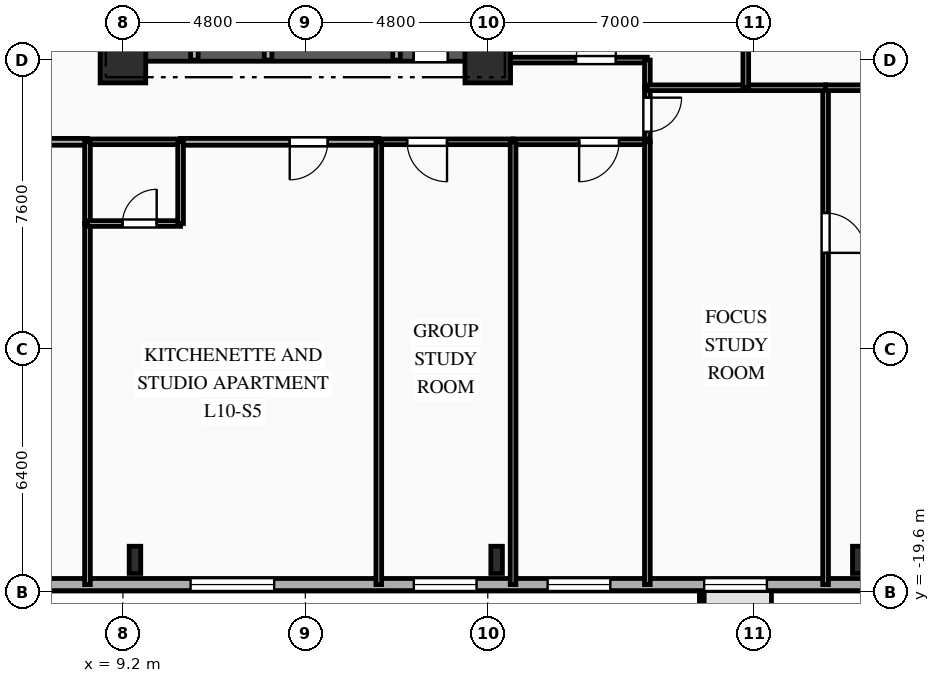
"""IFC4 building model, lengths in metres.
Left out: names, types, materials, properties, quantities, classifications, styles, units other than length and angle.
Written with IfcOpenShell. Run it as: python <this file> out.ifc"""

import sys

from ifc_helpers import new_model, si_unit, direction, frame, frame_2d, origin, origin_2d, place, context, subcontext, project, spatial, rectangle, i_section, extrude, element, fill, save


model = new_model("IFC4")
c1 = context("Model", 3, precision=1e-05, world=origin(), true_north=direction((0.0, 1.0)))
c2 = subcontext(c1, "Body", "Model", "MODEL_VIEW")
j1 = project(units=[si_unit("LENGTHUNIT", "METRE"), si_unit("PLANEANGLEUNIT", "RADIAN")], contexts=[c1])
p1 = place(None, origin())
s1 = spatial("IfcSite", under=j1, at=p1, CompositionType="ELEMENT")
p2 = place(p1, origin())
s2 = spatial("IfcBuilding", under=s1, at=p2, CompositionType="ELEMENT")
p3 = place(p2, frame((0.0, 0.0, 40.4)))
s3 = spatial("IfcBuildingStorey", under=s2, at=p3, CompositionType="ELEMENT", Elevation=40.4)
for number, where, z_axis, x_axis in (
    (1, (9.2, -5.6, 0.0), (0.0, 0.0, 1.0), (1.0, 0.0, 0.0)),
    (2, (18.8, -5.6, 0.0), (0.0, 0.0, 1.0), (1.0, 0.0, 0.0)),
):
    element("IfcColumn", number, at=place(p3, frame(where, z_axis=z_axis, x_axis=x_axis)), inside=s3, PredefinedType="COLUMN", context=c2, shape_type="SweptSolid", body=[
        extrude(rectangle(XDim=1.2, YDim=1.2, at=origin_2d()), origin(), (0.0, 0.0, 1.0), 3.35),
    ])
for number, where, z_axis, x_axis in (
    (3, (9.517, -18.75, 0.0), (0.0, 0.0, 1.0), (1.0, 0.0, 0.0)),
    (4, (19.033, -18.75, 0.0), (0.0, 0.0, 1.0), (1.0, 0.0, 0.0)),
    (5, (28.55, -18.75, 0.0), (0.0, 0.0, 1.0), (1.0, 0.0, 0.0)),
):
    element("IfcColumn", number, at=place(p3, frame(where, z_axis=z_axis, x_axis=x_axis)), inside=s3, PredefinedType="COLUMN", context=c2, shape_type="SweptSolid", body=[
        extrude(i_section(OverallWidth=0.304, OverallDepth=0.716, WebThickness=0.021, FlangeThickness=0.04, FilletRadius=0.027, at=origin_2d()), origin(), (0.0, 0.0, 1.0), 3.35),
    ])
p4 = place(p3, frame((29.2, -19.4, 0.0), z_axis=(0.0, 0.0, 1.0), x_axis=(-1.0, 0.0, 0.0)))
e6 = element("IfcWall", 6, at=p4, inside=s3, PredefinedType="SOLIDWALL", context=c2, shape_type="SweptSolid", body=[
    extrude(rectangle(XDim=58.4, YDim=0.32, at=frame_2d((29.2, 0.0))), origin(), (0.0, 0.0, 1.0), 3.035),
])
p5 = place(p4, frame((3.055, 0.0, 0.85)))
e7 = element("IfcOpeningElement", 7, at=p5, cuts=e6, PredefinedType="OPENING", context=c2, shape_type="SweptSolid", body=[
    extrude(rectangle(XDim=1.65, YDim=1.85, at=frame_2d((0.825, 0.925))), frame((0.0, 0.17, 0.0), z_axis=(0.0, -1.0, 0.0), x_axis=(1.0, 0.0, 0.0)), (0.0, 0.0, 1.0), 0.34),
])
p6 = place(p4, frame((7.175, 0.0, 0.85)))
e8 = element("IfcOpeningElement", 8, at=p6, cuts=e6, PredefinedType="OPENING", context=c2, shape_type="SweptSolid", body=[
    extrude(rectangle(XDim=1.65, YDim=1.85, at=frame_2d((0.825, 0.925))), frame((0.0, 0.17, 0.0), z_axis=(0.0, -1.0, 0.0), x_axis=(1.0, 0.0, 0.0)), (0.0, 0.0, 1.0), 0.34),
])
p7 = place(p4, frame((10.695, 0.0, 0.85)))
e9 = element("IfcOpeningElement", 9, at=p7, cuts=e6, PredefinedType="OPENING", context=c2, shape_type="SweptSolid", body=[
    extrude(rectangle(XDim=1.65, YDim=1.85, at=frame_2d((0.825, 0.925))), frame((0.0, 0.17, 0.0), z_axis=(0.0, -1.0, 0.0), x_axis=(1.0, 0.0, 0.0)), (0.0, 0.0, 1.0), 0.34),
])
p8 = place(p4, frame((16.02, 0.0, 0.85)))
e10 = element("IfcOpeningElement", 10, at=p8, cuts=e6, PredefinedType="OPENING", context=c2, shape_type="SweptSolid", body=[
    extrude(rectangle(XDim=2.2, YDim=1.85, at=frame_2d((1.1, 0.925))), frame((0.0, 0.17, 0.0), z_axis=(0.0, -1.0, 0.0), x_axis=(1.0, 0.0, 0.0)), (0.0, 0.0, 1.0), 0.34),
])
p9 = place(p4, frame((23.7, 0.0, 0.85)))
e11 = element("IfcOpeningElement", 11, at=p9, cuts=e6, PredefinedType="OPENING", context=c2, shape_type="SweptSolid", body=[
    extrude(rectangle(XDim=2.2, YDim=1.85, at=frame_2d((1.1, 0.925))), frame((0.0, 0.17, 0.0), z_axis=(0.0, -1.0, 0.0), x_axis=(1.0, 0.0, 0.0)), (0.0, 0.0, 1.0), 0.34),
])
p10 = place(p4, frame((31.38, 0.0, 0.85)))
e12 = element("IfcOpeningElement", 12, at=p10, cuts=e6, PredefinedType="OPENING", context=c2, shape_type="SweptSolid", body=[
    extrude(rectangle(XDim=2.2, YDim=1.85, at=frame_2d((1.1, 0.925))), frame((0.0, 0.17, 0.0), z_axis=(0.0, -1.0, 0.0), x_axis=(1.0, 0.0, 0.0)), (0.0, 0.0, 1.0), 0.34),
])
p11 = place(p4, frame((39.06, 0.0, 0.85)))
e13 = element("IfcOpeningElement", 13, at=p11, cuts=e6, PredefinedType="OPENING", context=c2, shape_type="SweptSolid", body=[
    extrude(rectangle(XDim=2.2, YDim=1.85, at=frame_2d((1.1, 0.925))), frame((0.0, 0.17, 0.0), z_axis=(0.0, -1.0, 0.0), x_axis=(1.0, 0.0, 0.0)), (0.0, 0.0, 1.0), 0.34),
])
p12 = place(p4, frame((45.215, 0.0, 0.85)))
e14 = element("IfcOpeningElement", 14, at=p12, cuts=e6, PredefinedType="OPENING", context=c2, shape_type="SweptSolid", body=[
    extrude(rectangle(XDim=1.65, YDim=1.85, at=frame_2d((0.825, 0.925))), frame((0.0, 0.17, 0.0), z_axis=(0.0, -1.0, 0.0), x_axis=(1.0, 0.0, 0.0)), (0.0, 0.0, 1.0), 0.34),
])
p13 = place(p4, frame((49.335, 0.0, 0.85)))
e15 = element("IfcOpeningElement", 15, at=p13, cuts=e6, PredefinedType="OPENING", context=c2, shape_type="SweptSolid", body=[
    extrude(rectangle(XDim=1.65, YDim=1.85, at=frame_2d((0.825, 0.925))), frame((0.0, 0.17, 0.0), z_axis=(0.0, -1.0, 0.0), x_axis=(1.0, 0.0, 0.0)), (0.0, 0.0, 1.0), 0.34),
])
p14 = place(p3, frame((9.2, -5.35, 0.0), z_axis=(0.0, 0.0, 1.0), x_axis=(1.0, 0.0, 0.0)))
e16 = element("IfcWall", 16, at=p14, inside=s3, PredefinedType="SHEAR", context=c2, shape_type="SweptSolid", body=[
    extrude(rectangle(XDim=9.6, YDim=0.56, at=frame_2d((4.8, 0.0))), origin(), (0.0, 0.0, 1.0), 3.035),
])
p15 = place(p14, frame((7.65, 0.0, 0.0)))
e17 = element("IfcOpeningElement", 17, at=p15, cuts=e16, PredefinedType="OPENING", context=c2, shape_type="SweptSolid", body=[
    extrude(rectangle(XDim=0.9, YDim=2.1, at=frame_2d((0.45, 1.05))), frame((0.0, 0.29, 0.0), z_axis=(0.0, -1.0, 0.0), x_axis=(1.0, 0.0, 0.0)), (0.0, 0.0, 1.0), 0.58),
])
p16 = place(p3, frame((16.4, -2.11, 0.0), z_axis=(0.0, 0.0, 1.0), x_axis=(0.0, -1.0, 0.0)))
e18 = element("IfcWall", 18, at=p16, inside=s3, PredefinedType="PARTITIONING", context=c2, shape_type="SweptSolid", body=[
    extrude(rectangle(XDim=3.49, YDim=0.2, at=frame_2d((1.745, 0.0))), origin(), (0.0, 0.0, 1.0), 3.035),
])
for number, where, z_axis, x_axis in (
    (19, (11.08, -5.6, 0.0), (0.0, 0.0, 1.0), (0.0, 1.0, 0.0)),
    (20, (13.02, -5.6, 0.0), (0.0, 0.0, 1.0), (0.0, 1.0, 0.0)),
):
    element("IfcWall", number, at=place(p3, frame(where, z_axis=z_axis, x_axis=x_axis)), inside=s3, PredefinedType="PARTITIONING", context=c2, shape_type="SweptSolid", body=[
        extrude(rectangle(XDim=2.25, YDim=0.2, at=frame_2d((1.125, 0.0))), origin(), (0.0, 0.0, 1.0), 3.035),
    ])
p17 = place(p3, frame((23.0, -6.327, 0.0), z_axis=(0.0, 0.0, 1.0), x_axis=(0.0, -1.0, 0.0)))
e21 = element("IfcWall", 21, at=p17, inside=s3, PredefinedType="PARTITIONING", context=c2, shape_type="SweptSolid", body=[
    extrude(rectangle(XDim=1.423, YDim=0.15, at=frame_2d((0.711, 0.0))), origin(), (0.0, 0.0, 1.0), 3.035),
])
p18 = place(p17, frame((0.261, 0.0, 0.0)))
e22 = element("IfcOpeningElement", 22, at=p18, cuts=e21, PredefinedType="OPENING", context=c2, shape_type="SweptSolid", body=[
    extrude(rectangle(XDim=0.9, YDim=2.1, at=frame_2d((0.45, 1.05))), frame((0.0, 0.085, 0.0), z_axis=(0.0, -1.0, 0.0), x_axis=(1.0, 0.0, 0.0)), (0.0, 0.0, 1.0), 0.17),
])
p19 = place(p3, frame((18.8, -5.6, 0.0), z_axis=(0.0, 0.0, 1.0), x_axis=(1.0, 0.0, 0.0)))
e23 = element("IfcWall", 23, at=p19, inside=s3, PredefinedType="PARTITIONING", context=c2, shape_type="SweptSolid", body=[
    extrude(rectangle(XDim=4.2, YDim=0.15, at=frame_2d((2.1, 0.0))), origin(), (0.0, 0.0, 1.0), 3.035),
])
p20 = place(p19, frame((2.321, 0.0, 0.0)))
e24 = element("IfcOpeningElement", 24, at=p20, cuts=e23, PredefinedType="OPENING", context=c2, shape_type="SweptSolid", body=[
    extrude(rectangle(XDim=1.05, YDim=2.15, at=frame_2d((0.525, 1.075))), frame((0.0, 0.085, 0.0), z_axis=(0.0, -1.0, 0.0), x_axis=(1.0, 0.0, 0.0)), (0.0, 0.0, 1.0), 0.17),
])
p21 = place(p3, frame((23.0, -5.6, 0.0), z_axis=(0.0, 0.0, 1.0), x_axis=(0.0, -1.0, 0.0)))
e25 = element("IfcWall", 25, at=p21, inside=s3, PredefinedType="PARTITIONING", context=c2, shape_type="SweptSolid", body=[
    extrude(rectangle(XDim=0.727, YDim=0.15, at=frame_2d((0.363, 0.0))), origin(), (0.0, 0.0, 1.0), 3.035),
])
p22 = place(p3, frame((8.267, -7.75, 0.0), z_axis=(0.0, 0.0, 1.0), x_axis=(-1.0, 0.0, 0.0)))
e26 = element("IfcWall", 26, at=p22, inside=s3, PredefinedType="PARTITIONING", context=c2, shape_type="SweptSolid", body=[
    extrude(rectangle(XDim=5.217, YDim=0.18, at=frame_2d((2.608, 0.0))), origin(), (0.0, 0.0, 1.0), 3.035),
])
p23 = place(p22, frame((3.255, 0.0, 0.0)))
e27 = element("IfcOpeningElement", 27, at=p23, cuts=e26, PredefinedType="OPENING", context=c2, shape_type="SweptSolid", body=[
    extrude(rectangle(XDim=1.0, YDim=2.15, at=frame_2d((0.5, 1.075))), frame((0.0, 0.1, 0.0), z_axis=(0.0, -1.0, 0.0), x_axis=(1.0, 0.0, 0.0)), (0.0, 0.0, 1.0), 0.2),
])
p24 = place(p3, frame((15.933, -7.75, 0.0), z_axis=(0.0, 0.0, 1.0), x_axis=(-1.0, 0.0, 0.0)))
e28 = element("IfcWall", 28, at=p24, inside=s3, PredefinedType="PARTITIONING", context=c2, shape_type="SweptSolid", body=[
    extrude(rectangle(XDim=5.216, YDim=0.18, at=frame_2d((2.608, 0.0))), origin(), (0.0, 0.0, 1.0), 3.035),
])
p25 = place(p24, frame((1.344, 0.0, 0.0)))
e29 = element("IfcOpeningElement", 29, at=p25, cuts=e28, PredefinedType="OPENING", context=c2, shape_type="SweptSolid", body=[
    extrude(rectangle(XDim=1.0, YDim=2.15, at=frame_2d((0.5, 1.075))), frame((0.0, 0.1, 0.0), z_axis=(0.0, -1.0, 0.0), x_axis=(1.0, 0.0, 0.0)), (0.0, 0.0, 1.0), 0.2),
])
p26 = place(p3, frame((10.717, -7.75, 0.0), z_axis=(0.0, 0.0, 1.0), x_axis=(-1.0, 0.0, 0.0)))
e30 = element("IfcWall", 30, at=p26, inside=s3, PredefinedType="PLUMBINGWALL", context=c2, shape_type="SweptSolid", body=[
    extrude(rectangle(XDim=2.45, YDim=0.15, at=frame_2d((1.225, 0.0))), origin(), (0.0, 0.0, 1.0), 3.035),
])
p27 = place(p3, frame((19.467, -7.75, 0.0), z_axis=(0.0, 0.0, 1.0), x_axis=(-1.0, 0.0, 0.0)))
e31 = element("IfcWall", 31, at=p27, inside=s3, PredefinedType="PARTITIONING", context=c2, shape_type="SweptSolid", body=[
    extrude(rectangle(XDim=3.533, YDim=0.15, at=frame_2d((1.767, 0.0))), origin(), (0.0, 0.0, 1.0), 3.035),
])
p28 = place(p27, frame((1.738, 0.0, 0.0)))
e32 = element("IfcOpeningElement", 32, at=p28, cuts=e31, PredefinedType="OPENING", context=c2, shape_type="SweptSolid", body=[
    extrude(rectangle(XDim=1.05, YDim=2.15, at=frame_2d((0.525, 1.075))), frame((0.0, 0.085, 0.0), z_axis=(0.0, -1.0, 0.0), x_axis=(1.0, 0.0, 0.0)), (0.0, 0.0, 1.0), 0.17),
])
p29 = place(p3, frame((23.0, -7.75, 0.0), z_axis=(0.0, 0.0, 1.0), x_axis=(-1.0, 0.0, 0.0)))
e33 = element("IfcWall", 33, at=p29, inside=s3, PredefinedType="PARTITIONING", context=c2, shape_type="SweptSolid", body=[
    extrude(rectangle(XDim=3.533, YDim=0.15, at=frame_2d((1.767, 0.0))), origin(), (0.0, 0.0, 1.0), 3.035),
])
p30 = place(p29, frame((0.745, 0.0, 0.0)))
e34 = element("IfcOpeningElement", 34, at=p30, cuts=e33, PredefinedType="OPENING", context=c2, shape_type="SweptSolid", body=[
    extrude(rectangle(XDim=1.05, YDim=2.15, at=frame_2d((0.525, 1.075))), frame((0.0, 0.085, 0.0), z_axis=(0.0, -1.0, 0.0), x_axis=(1.0, 0.0, 0.0)), (0.0, 0.0, 1.0), 0.17),
])
p31 = place(p3, frame((27.69, -6.327, 0.0), z_axis=(0.0, 0.0, 1.0), x_axis=(0.0, -1.0, 0.0)))
e35 = element("IfcWall", 35, at=p31, inside=s3, PredefinedType="PARTITIONING", context=c2, shape_type="SweptSolid", body=[
    extrude(rectangle(XDim=13.073, YDim=0.15, at=frame_2d((6.537, 0.0))), origin(), (0.0, 0.0, 1.0), 3.035),
])
p32 = place(p31, frame((3.296, 0.0, 0.0)))
e36 = element("IfcOpeningElement", 36, at=p32, cuts=e35, PredefinedType="OPENING", context=c2, shape_type="SweptSolid", body=[
    extrude(rectangle(XDim=1.05, YDim=2.15, at=frame_2d((0.525, 1.075))), frame((0.0, 0.085, 0.0), z_axis=(0.0, -1.0, 0.0), x_axis=(1.0, 0.0, 0.0)), (0.0, 0.0, 1.0), 0.17),
])
p33 = place(p3, frame((23.0, -6.327, 0.0), z_axis=(0.0, 0.0, 1.0), x_axis=(1.0, 0.0, 0.0)))
e37 = element("IfcWall", 37, at=p33, inside=s3, PredefinedType="PARTITIONING", context=c2, shape_type="SweptSolid", body=[
    extrude(rectangle(XDim=2.59, YDim=0.15, at=frame_2d((1.295, 0.0))), origin(), (0.0, 0.0, 1.0), 3.035),
])
p34 = place(p3, frame((25.59, -6.327, 0.0), z_axis=(0.0, 0.0, 1.0), x_axis=(1.0, 0.0, 0.0)))
e38 = element("IfcWall", 38, at=p34, inside=s3, PredefinedType="PARTITIONING", context=c2, shape_type="SweptSolid", body=[
    extrude(rectangle(XDim=2.1, YDim=0.15, at=frame_2d((1.05, 0.0))), origin(), (0.0, 0.0, 1.0), 3.035),
])
p35 = place(p3, frame((23.0, -19.4, 0.0), z_axis=(0.0, 0.0, 1.0), x_axis=(0.0, 1.0, 0.0)))
e39 = element("IfcWall", 39, at=p35, inside=s3, PredefinedType="PARTITIONING", context=c2, shape_type="SweptSolid", body=[
    extrude(rectangle(XDim=11.65, YDim=0.15, at=frame_2d((5.825, 0.0))), origin(), (0.0, 0.0, 1.0), 3.035),
])
p36 = place(p3, frame((27.69, -6.327, 0.0), z_axis=(0.0, 0.0, 1.0), x_axis=(1.0, 0.0, 0.0)))
e40 = element("IfcWall", 40, at=p36, inside=s3, PredefinedType="PARTITIONING", context=c2, shape_type="SweptSolid", body=[
    extrude(rectangle(XDim=5.11, YDim=0.15, at=frame_2d((2.555, 0.0))), origin(), (0.0, 0.0, 1.0), 3.035),
])
p37 = place(p3, frame((25.59, 6.327, 0.0), z_axis=(0.0, 0.0, 1.0), x_axis=(0.0, -1.0, 0.0)))
e41 = element("IfcWall", 41, at=p37, inside=s3, PredefinedType="PARTITIONING", context=c2, shape_type="SweptSolid", body=[
    extrude(rectangle(XDim=12.654, YDim=0.15, at=frame_2d((6.327, 0.0))), origin(), (0.0, 0.0, 1.0), 2.69),
])
p38 = place(p37, frame((5.802, 0.0, 0.0)))
e42 = element("IfcOpeningElement", 42, at=p38, cuts=e41, PredefinedType="OPENING", context=c2, shape_type="SweptSolid", body=[
    extrude(rectangle(XDim=1.05, YDim=2.15, at=frame_2d((0.525, 1.075))), frame((0.0, 0.085, 0.0), z_axis=(0.0, -1.0, 0.0), x_axis=(1.0, 0.0, 0.0)), (0.0, 0.0, 1.0), 0.17),
])
p39 = place(p3, frame((8.267, -9.9, 0.0), z_axis=(0.0, 0.0, 1.0), x_axis=(0.0, -1.0, 0.0)))
e43 = element("IfcWall", 43, at=p39, inside=s3, PredefinedType="PARTITIONING", context=c2, shape_type="SweptSolid", body=[
    extrude(rectangle(XDim=9.5, YDim=0.15, at=frame_2d((4.75, 0.0))), origin(), (0.0, 0.0, 1.0), 3.035),
])
p40 = place(p3, frame((8.267, -7.75, 0.0), z_axis=(0.0, 0.0, 1.0), x_axis=(0.0, -1.0, 0.0)))
e44 = element("IfcWall", 44, at=p40, inside=s3, PredefinedType="PLUMBINGWALL", context=c2, shape_type="SweptSolid", body=[
    extrude(rectangle(XDim=2.15, YDim=0.15, at=frame_2d((1.075, 0.0))), origin(), (0.0, 0.0, 1.0), 3.035),
])
p41 = place(p3, frame((8.267, -9.9, 0.0), z_axis=(0.0, 0.0, 1.0), x_axis=(1.0, 0.0, 0.0)))
e45 = element("IfcWall", 45, at=p41, inside=s3, PredefinedType="PLUMBINGWALL", context=c2, shape_type="SweptSolid", body=[
    extrude(rectangle(XDim=2.45, YDim=0.15, at=frame_2d((1.225, 0.0))), origin(), (0.0, 0.0, 1.0), 3.035),
])
p42 = place(p41, frame((0.921, 0.0, 0.0)))
e46 = element("IfcOpeningElement", 46, at=p42, cuts=e45, PredefinedType="OPENING", context=c2, shape_type="SweptSolid", body=[
    extrude(rectangle(XDim=0.9, YDim=2.1, at=frame_2d((0.45, 1.05))), frame((0.0, 0.085, 0.0), z_axis=(0.0, -1.0, 0.0), x_axis=(1.0, 0.0, 0.0)), (0.0, 0.0, 1.0), 0.17),
])
p43 = place(p3, frame((10.717, -9.9, 0.0), z_axis=(0.0, 0.0, 1.0), x_axis=(0.0, 1.0, 0.0)))
e47 = element("IfcWall", 47, at=p43, inside=s3, PredefinedType="PLUMBINGWALL", context=c2, shape_type="SweptSolid", body=[
    extrude(rectangle(XDim=2.15, YDim=0.15, at=frame_2d((1.075, 0.0))), origin(), (0.0, 0.0, 1.0), 3.035),
])
for number, where, z_axis, x_axis in (
    (48, (15.933, -7.75, 0.0), (0.0, 0.0, 1.0), (0.0, -1.0, 0.0)),
    (49, (19.467, -7.75, 0.0), (0.0, 0.0, 1.0), (0.0, -1.0, 0.0)),
):
    element("IfcWall", number, at=place(p3, frame(where, z_axis=z_axis, x_axis=x_axis)), inside=s3, PredefinedType="PARTITIONING", context=c2, shape_type="SweptSolid", body=[
        extrude(rectangle(XDim=11.65, YDim=0.15, at=frame_2d((5.825, 0.0))), origin(), (0.0, 0.0, 1.0), 3.035),
    ])
p44 = place(p5, origin())
e50 = element("IfcWindow", 50, at=p44, inside=s3, PartitioningType="SINGLE_PANEL", PredefinedType="WINDOW", context=c2, shape_type="SweptSolid", body=[
    extrude(rectangle(XDim=1.65, YDim=1.85, at=frame_2d((0.825, 0.925))), frame((0.0, 0.03, 0.0), z_axis=(0.0, -1.0, 0.0), x_axis=(1.0, 0.0, 0.0)), (0.0, 0.0, 1.0), 0.06),
])
fill(e7, e50)
p45 = place(p6, origin())
e51 = element("IfcWindow", 51, at=p45, inside=s3, PartitioningType="SINGLE_PANEL", PredefinedType="WINDOW", context=c2, shape_type="SweptSolid", body=[
    extrude(rectangle(XDim=1.65, YDim=1.85, at=frame_2d((0.825, 0.925))), frame((0.0, 0.03, 0.0), z_axis=(0.0, -1.0, 0.0), x_axis=(1.0, 0.0, 0.0)), (0.0, 0.0, 1.0), 0.06),
])
fill(e8, e51)
p46 = place(p7, origin())
e52 = element("IfcWindow", 52, at=p46, inside=s3, PartitioningType="SINGLE_PANEL", PredefinedType="WINDOW", context=c2, shape_type="SweptSolid", body=[
    extrude(rectangle(XDim=1.65, YDim=1.85, at=frame_2d((0.825, 0.925))), frame((0.0, 0.03, 0.0), z_axis=(0.0, -1.0, 0.0), x_axis=(1.0, 0.0, 0.0)), (0.0, 0.0, 1.0), 0.06),
])
fill(e9, e52)
p47 = place(p8, origin())
e53 = element("IfcWindow", 53, at=p47, inside=s3, PartitioningType="SINGLE_PANEL", PredefinedType="WINDOW", context=c2, shape_type="SweptSolid", body=[
    extrude(rectangle(XDim=2.2, YDim=1.85, at=frame_2d((1.1, 0.925))), frame((0.0, 0.03, 0.0), z_axis=(0.0, -1.0, 0.0), x_axis=(1.0, 0.0, 0.0)), (0.0, 0.0, 1.0), 0.06),
])
fill(e10, e53)
p48 = place(p18, origin())
e54 = element("IfcDoor", 54, at=p48, inside=s3, OperationType="SINGLE_SWING_LEFT", PredefinedType="DOOR", context=c2, shape_type="SweptSolid", body=[
    extrude(rectangle(XDim=0.9, YDim=2.1, at=frame_2d((0.45, 1.05))), frame((0.0, 0.025, 0.0), z_axis=(0.0, -1.0, 0.0), x_axis=(1.0, 0.0, 0.0)), (0.0, 0.0, 1.0), 0.05),
])
fill(e22, e54)
p49 = place(p20, origin())
e55 = element("IfcDoor", 55, at=p49, inside=s3, OperationType="SINGLE_SWING_RIGHT", PredefinedType="DOOR", context=c2, shape_type="SweptSolid", body=[
    extrude(rectangle(XDim=1.05, YDim=2.15, at=frame_2d((0.525, 1.075))), frame((0.0, 0.025, 0.0), z_axis=(0.0, -1.0, 0.0), x_axis=(1.0, 0.0, 0.0)), (0.0, 0.0, 1.0), 0.05),
])
fill(e24, e55)
p50 = place(p25, origin())
e56 = element("IfcDoor", 56, at=p50, inside=s3, OperationType="SINGLE_SWING_RIGHT", PredefinedType="DOOR", context=c2, shape_type="SweptSolid", body=[
    extrude(rectangle(XDim=1.0, YDim=2.15, at=frame_2d((0.5, 1.075))), frame((0.0, 0.025, 0.0), z_axis=(0.0, -1.0, 0.0), x_axis=(1.0, 0.0, 0.0)), (0.0, 0.0, 1.0), 0.05),
])
fill(e29, e56)
p51 = place(p28, origin())
e57 = element("IfcDoor", 57, at=p51, inside=s3, OperationType="SINGLE_SWING_LEFT", PredefinedType="DOOR", context=c2, shape_type="SweptSolid", body=[
    extrude(rectangle(XDim=1.05, YDim=2.15, at=frame_2d((0.525, 1.075))), frame((0.0, 0.025, 0.0), z_axis=(0.0, -1.0, 0.0), x_axis=(1.0, 0.0, 0.0)), (0.0, 0.0, 1.0), 0.05),
])
fill(e32, e57)
p52 = place(p30, origin())
e58 = element("IfcDoor", 58, at=p52, inside=s3, OperationType="SINGLE_SWING_RIGHT", PredefinedType="DOOR", context=c2, shape_type="SweptSolid", body=[
    extrude(rectangle(XDim=1.05, YDim=2.15, at=frame_2d((0.525, 1.075))), frame((0.0, 0.025, 0.0), z_axis=(0.0, -1.0, 0.0), x_axis=(1.0, 0.0, 0.0)), (0.0, 0.0, 1.0), 0.05),
])
fill(e34, e58)
p53 = place(p32, origin())
e59 = element("IfcDoor", 59, at=p53, inside=s3, OperationType="SINGLE_SWING_RIGHT", PredefinedType="DOOR", context=c2, shape_type="SweptSolid", body=[
    extrude(rectangle(XDim=1.05, YDim=2.15, at=frame_2d((0.525, 1.075))), frame((0.0, 0.025, 0.0), z_axis=(0.0, -1.0, 0.0), x_axis=(1.0, 0.0, 0.0)), (0.0, 0.0, 1.0), 0.05),
])
fill(e36, e59)
p54 = place(p42, origin())
e60 = element("IfcDoor", 60, at=p54, inside=s3, OperationType="SINGLE_SWING_RIGHT", PredefinedType="DOOR", context=c2, shape_type="SweptSolid", body=[
    extrude(rectangle(XDim=0.9, YDim=2.1, at=frame_2d((0.45, 1.05))), frame((0.0, 0.025, 0.0), z_axis=(0.0, -1.0, 0.0), x_axis=(1.0, 0.0, 0.0)), (0.0, 0.0, 1.0), 0.05),
])
fill(e46, e60)
save(model, sys.argv[1])
